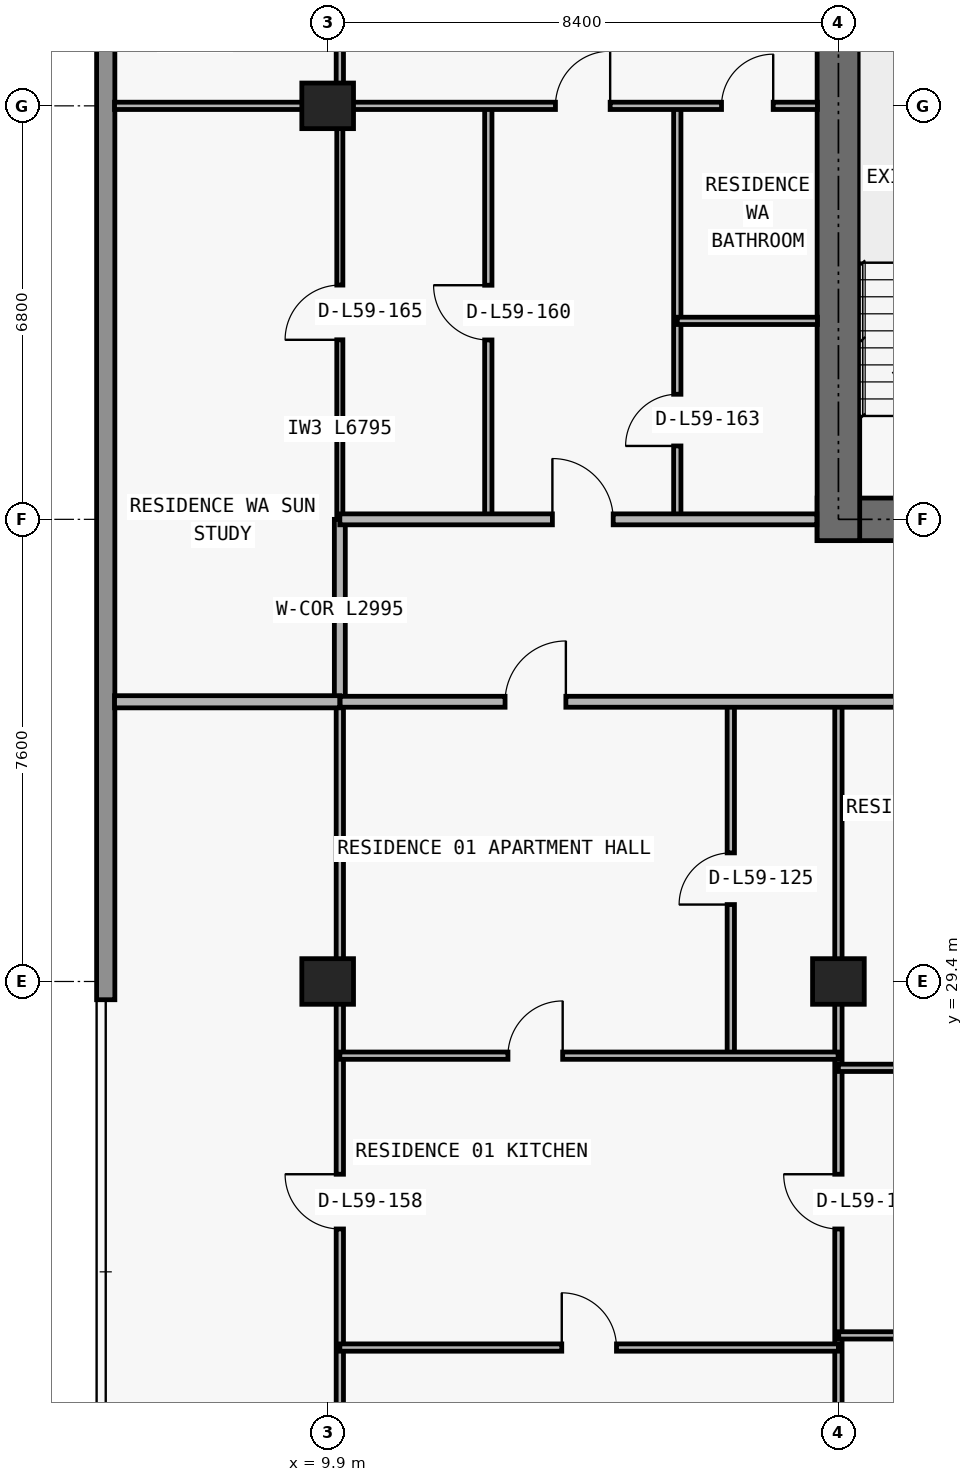
"""IFC4 building model, lengths in metres.
Left out: names, types, materials, properties, quantities, classifications, styles, units other than length and angle.
Written with IfcOpenShell. Run it as: python <this file> out.ifc"""

import sys

from ifc_helpers import new_model, si_unit, direction, frame, frame_2d, origin, origin_2d, place, context, subcontext, project, spatial, rectangle, extrude, element, fill, save


model = new_model("IFC4")
c1 = context("Model", 3, precision=1e-05, world=origin(), true_north=direction((0.0, 1.0)))
c2 = subcontext(c1, "Body", "Model", "MODEL_VIEW")
j1 = project(units=[si_unit("LENGTHUNIT", "METRE"), si_unit("PLANEANGLEUNIT", "RADIAN")], contexts=[c1])
p1 = place(None, origin())
s1 = spatial("IfcSite", under=j1, at=p1, CompositionType="ELEMENT")
p2 = place(p1, origin())
s2 = spatial("IfcBuilding", under=s1, at=p2, CompositionType="ELEMENT")
p3 = place(p2, frame((0.0, 0.0, 211.5)))
s3 = spatial("IfcBuildingStorey", under=s2, at=p3, CompositionType="ELEMENT", Elevation=211.5)
for number, where, z_axis, x_axis in (
    (1, (9.9, 29.4, 0.0), (0.0, 0.0, 1.0), (1.0, 0.0, 0.0)),
    (2, (18.3, 29.4, 0.0), (0.0, 0.0, 1.0), (1.0, 0.0, 0.0)),
    (3, (9.9, 43.8, 0.0), (0.0, 0.0, 1.0), (1.0, 0.0, 0.0)),
):
    element("IfcColumn", number, at=place(p3, frame(where, z_axis=z_axis, x_axis=x_axis)), inside=s3, PredefinedType="COLUMN", context=c2, shape_type="SweptSolid", body=[
        extrude(rectangle(XDim=0.85, YDim=0.75, at=origin_2d()), origin(), (0.0, 0.0, 1.0), 3.05),
    ])
p4 = place(p3, frame((17.95, 37.0, 0.0), z_axis=(0.0, 0.0, 1.0), x_axis=(1.0, 0.0, 0.0)))
e4 = element("IfcWall", 4, at=p4, inside=s3, PredefinedType="SHEAR", context=c2, shape_type="SweptSolid", body=[
    extrude(rectangle(XDim=41.9, YDim=0.7, at=frame_2d((20.95, 0.0))), origin(), (0.0, 0.0, 1.0), 3.05),
])
p5 = place(p4, frame((14.35, 0.0, 0.0)))
e5 = element("IfcOpeningElement", 5, at=p5, cuts=e4, PredefinedType="OPENING", context=c2, shape_type="SweptSolid", body=[
    extrude(rectangle(XDim=1.1, YDim=2.15, at=frame_2d((0.55, 1.075))), frame((0.0, 0.36, 0.0), z_axis=(0.0, -1.0, 0.0), x_axis=(1.0, 0.0, 0.0)), (0.0, 0.0, 1.0), 0.72),
])
p6 = place(p4, frame((6.2, 0.0, 0.0)))
e6 = element("IfcOpeningElement", 6, at=p6, cuts=e4, PredefinedType="OPENING", context=c2, shape_type="SweptSolid", body=[
    extrude(rectangle(XDim=1.05, YDim=2.15, at=frame_2d((0.525, 1.075))), frame((0.0, 0.36, 0.0), z_axis=(0.0, -1.0, 0.0), x_axis=(1.0, 0.0, 0.0)), (0.0, 0.0, 1.0), 0.72),
])
p7 = place(p4, frame((34.7, 0.0, 0.0)))
e7 = element("IfcOpeningElement", 7, at=p7, cuts=e4, PredefinedType="OPENING", context=c2, shape_type="SweptSolid", body=[
    extrude(rectangle(XDim=1.05, YDim=2.15, at=frame_2d((0.525, 1.075))), frame((0.0, 0.36, 0.0), z_axis=(0.0, -1.0, 0.0), x_axis=(1.0, 0.0, 0.0)), (0.0, 0.0, 1.0), 0.72),
])
p8 = place(p4, frame((10.812, 0.0, 0.0)))
e8 = element("IfcOpeningElement", 8, at=p8, cuts=e4, PredefinedType="OPENING", context=c2, shape_type="SweptSolid", body=[
    extrude(rectangle(XDim=1.05, YDim=2.15, at=frame_2d((0.525, 1.075))), frame((0.0, 0.36, 0.0), z_axis=(0.0, -1.0, 0.0), x_axis=(1.0, 0.0, 0.0)), (0.0, 0.0, 1.0), 0.72),
])
p9 = place(p4, frame((24.05, 0.0, 0.0)))
e9 = element("IfcOpeningElement", 9, at=p9, cuts=e4, PredefinedType="OPENING", context=c2, shape_type="SweptSolid", body=[
    extrude(rectangle(XDim=1.05, YDim=2.15, at=frame_2d((0.525, 1.075))), frame((0.0, 0.36, 0.0), z_axis=(0.0, -1.0, 0.0), x_axis=(1.0, 0.0, 0.0)), (0.0, 0.0, 1.0), 0.72),
])
p10 = place(p3, frame((18.3, 36.65, 0.0), z_axis=(0.0, 0.0, 1.0), x_axis=(0.0, 1.0, 0.0)))
e10 = element("IfcWall", 10, at=p10, inside=s3, PredefinedType="SHEAR", context=c2, shape_type="SweptSolid", body=[
    extrude(rectangle(XDim=13.95, YDim=0.7, at=frame_2d((6.975, 0.0))), origin(), (0.0, 0.0, 1.0), 3.05),
])
p11 = place(p3, frame((6.25, 29.1, 0.0), z_axis=(0.0, 0.0, 1.0), x_axis=(0.0, 1.0, 0.0)))
e11 = element("IfcWall", 11, at=p11, inside=s3, PredefinedType="STANDARD", context=c2, shape_type="SweptSolid", body=[
    extrude(rectangle(XDim=17.9, YDim=0.3, at=frame_2d((8.95, 0.0))), origin(), (0.0, 0.0, 1.0), 3.05),
])
p12 = place(p3, frame((10.1, 11.285, 0.0), z_axis=(0.0, 0.0, 1.0), x_axis=(0.0, 1.0, 0.0)))
e12 = element("IfcWall", 12, at=p12, inside=s3, PredefinedType="PARTITIONING", context=c2, shape_type="SweptSolid", body=[
    extrude(rectangle(XDim=22.715, YDim=0.12, at=frame_2d((11.357, 0.0))), origin(), (0.0, 0.0, 1.0), 2.263),
])
p13 = place(p12, frame((14.045, 0.0, 0.0)))
e13 = element("IfcOpeningElement", 13, at=p13, cuts=e12, PredefinedType="OPENING", context=c2, shape_type="SweptSolid", body=[
    extrude(rectangle(XDim=0.9, YDim=2.15, at=frame_2d((0.45, 1.075))), frame((0.0, 0.07, 0.0), z_axis=(0.0, -1.0, 0.0), x_axis=(1.0, 0.0, 0.0)), (0.0, 0.0, 1.0), 0.14),
])
p14 = place(p3, frame((10.1, 34.005, 0.0), z_axis=(0.0, 0.0, 1.0), x_axis=(0.0, 1.0, 0.0)))
e14 = element("IfcWall", 14, at=p14, inside=s3, PredefinedType="PARTITIONING", context=c2, shape_type="SweptSolid", body=[
    extrude(rectangle(XDim=2.995, YDim=0.18, at=frame_2d((1.498, 0.0))), origin(), (0.0, 0.0, 1.0), 2.263),
])
p15 = place(p3, frame((10.1, 37.005, 0.0), z_axis=(0.0, 0.0, 1.0), x_axis=(0.0, 1.0, 0.0)))
e15 = element("IfcWall", 15, at=p15, inside=s3, PredefinedType="MOVABLE", context=c2, shape_type="SweptSolid", body=[
    extrude(rectangle(XDim=6.795, YDim=0.1, at=frame_2d((3.397, 0.0))), origin(), (0.0, 0.0, 1.0), 2.263),
])
p16 = place(p15, frame((2.948, 0.0, 0.0)))
e16 = element("IfcOpeningElement", 16, at=p16, cuts=e15, PredefinedType="OPENING", context=c2, shape_type="SweptSolid", body=[
    extrude(rectangle(XDim=0.9, YDim=2.15, at=frame_2d((0.45, 1.075))), frame((0.0, 0.06, 0.0), z_axis=(0.0, -1.0, 0.0), x_axis=(1.0, 0.0, 0.0)), (0.0, 0.0, 1.0), 0.12),
])
p17 = place(p3, frame((10.1, 43.805, 0.0), z_axis=(0.0, 0.0, 1.0), x_axis=(0.0, 1.0, 0.0)))
e17 = element("IfcWall", 17, at=p17, inside=s3, PredefinedType="PARTITIONING", context=c2, shape_type="SweptSolid", body=[
    extrude(rectangle(XDim=3.075, YDim=0.12, at=frame_2d((1.538, 0.0))), origin(), (0.0, 0.0, 1.0), 3.05),
])
p18 = place(p17, frame((1.087, 0.0, 0.0)))
e18 = element("IfcOpeningElement", 18, at=p18, cuts=e17, PredefinedType="OPENING", context=c2, shape_type="SweptSolid", body=[
    extrude(rectangle(XDim=0.9, YDim=2.15, at=frame_2d((0.45, 1.075))), frame((0.0, 0.07, 0.0), z_axis=(0.0, -1.0, 0.0), x_axis=(1.0, 0.0, 0.0)), (0.0, 0.0, 1.0), 0.14),
])
p19 = place(p3, frame((12.542, 37.0, 0.0), z_axis=(0.0, 0.0, 1.0), x_axis=(0.0, 1.0, 0.0)))
e19 = element("IfcWall", 19, at=p19, inside=s3, PredefinedType="PARTITIONING", context=c2, shape_type="SweptSolid", body=[
    extrude(rectangle(XDim=6.8, YDim=0.12, at=frame_2d((3.4, 0.0))), origin(), (0.0, 0.0, 1.0), 3.05),
])
p20 = place(p19, frame((2.95, 0.0, 0.0)))
e20 = element("IfcOpeningElement", 20, at=p20, cuts=e19, PredefinedType="OPENING", context=c2, shape_type="SweptSolid", body=[
    extrude(rectangle(XDim=0.9, YDim=2.15, at=frame_2d((0.45, 1.075))), frame((0.0, 0.07, 0.0), z_axis=(0.0, -1.0, 0.0), x_axis=(1.0, 0.0, 0.0)), (0.0, 0.0, 1.0), 0.14),
])
p21 = place(p3, frame((15.65, 37.0, 0.0), z_axis=(0.0, 0.0, 1.0), x_axis=(0.0, 1.0, 0.0)))
e21 = element("IfcWall", 21, at=p21, inside=s3, PredefinedType="PARTITIONING", context=c2, shape_type="SweptSolid", body=[
    extrude(rectangle(XDim=6.8, YDim=0.12, at=frame_2d((3.4, 0.0))), origin(), (0.0, 0.0, 1.0), 3.05),
])
p22 = place(p21, frame((1.207, 0.0, 0.0)))
e22 = element("IfcOpeningElement", 22, at=p22, cuts=e21, PredefinedType="OPENING", context=c2, shape_type="SweptSolid", body=[
    extrude(rectangle(XDim=0.85, YDim=2.1, at=frame_2d((0.425, 1.05))), frame((0.0, 0.07, 0.0), z_axis=(0.0, -1.0, 0.0), x_axis=(1.0, 0.0, 0.0)), (0.0, 0.0, 1.0), 0.14),
])
p23 = place(p3, frame((16.53, 28.18, 0.0), z_axis=(0.0, 0.0, 1.0), x_axis=(0.0, 1.0, 0.0)))
e23 = element("IfcWall", 23, at=p23, inside=s3, PredefinedType="PARTITIONING", context=c2, shape_type="SweptSolid", body=[
    extrude(rectangle(XDim=5.82, YDim=0.12, at=frame_2d((2.91, 0.0))), origin(), (0.0, 0.0, 1.0), 3.05),
])
p24 = place(p23, frame((2.485, 0.0, 0.0)))
e24 = element("IfcOpeningElement", 24, at=p24, cuts=e23, PredefinedType="OPENING", context=c2, shape_type="SweptSolid", body=[
    extrude(rectangle(XDim=0.85, YDim=2.1, at=frame_2d((0.425, 1.05))), frame((0.0, 0.07, 0.0), z_axis=(0.0, -1.0, 0.0), x_axis=(1.0, 0.0, 0.0)), (0.0, 0.0, 1.0), 0.14),
])
p25 = place(p3, frame((18.3, 11.24, 0.0), z_axis=(0.0, 0.0, 1.0), x_axis=(0.0, 1.0, 0.0)))
e25 = element("IfcWall", 25, at=p25, inside=s3, PredefinedType="PARTITIONING", context=c2, shape_type="SweptSolid", body=[
    extrude(rectangle(XDim=22.76, YDim=0.12, at=frame_2d((11.38, 0.0))), origin(), (0.0, 0.0, 1.0), 2.263),
])
p26 = place(p25, frame((14.09, 0.0, 0.0)))
e26 = element("IfcOpeningElement", 26, at=p26, cuts=e25, PredefinedType="OPENING", context=c2, shape_type="SweptSolid", body=[
    extrude(rectangle(XDim=0.9, YDim=2.15, at=frame_2d((0.45, 1.075))), frame((0.0, 0.07, 0.0), z_axis=(0.0, -1.0, 0.0), x_axis=(1.0, 0.0, 0.0)), (0.0, 0.0, 1.0), 0.14),
])
p27 = place(p3, frame((10.1, 23.38, 0.0), z_axis=(0.0, 0.0, 1.0), x_axis=(1.0, 0.0, 0.0)))
e27 = element("IfcWall", 27, at=p27, inside=s3, PredefinedType="PARTITIONING", context=c2, shape_type="SweptSolid", body=[
    extrude(rectangle(XDim=8.2, YDim=0.12, at=frame_2d((4.1, 0.0))), origin(), (0.0, 0.0, 1.0), 3.05),
])
p28 = place(p27, frame((3.65, 0.0, 0.0)))
e28 = element("IfcOpeningElement", 28, at=p28, cuts=e27, PredefinedType="OPENING", context=c2, shape_type="SweptSolid", body=[
    extrude(rectangle(XDim=0.9, YDim=2.15, at=frame_2d((0.45, 1.075))), frame((0.0, 0.07, 0.0), z_axis=(0.0, -1.0, 0.0), x_axis=(1.0, 0.0, 0.0)), (0.0, 0.0, 1.0), 0.14),
])
p29 = place(p3, frame((18.305, 23.58, 0.0), z_axis=(0.0, 0.0, 1.0), x_axis=(1.0, 0.0, 0.0)))
e29 = element("IfcWall", 29, at=p29, inside=s3, PredefinedType="PARTITIONING", context=c2, shape_type="SweptSolid", body=[
    extrude(rectangle(XDim=8.175, YDim=0.12, at=frame_2d((4.087, 0.0))), origin(), (0.0, 0.0, 1.0), 3.05),
])
p30 = place(p29, frame((3.637, 0.0, 0.0)))
e30 = element("IfcOpeningElement", 30, at=p30, cuts=e29, PredefinedType="OPENING", context=c2, shape_type="SweptSolid", body=[
    extrude(rectangle(XDim=0.9, YDim=2.15, at=frame_2d((0.45, 1.075))), frame((0.0, 0.07, 0.0), z_axis=(0.0, -1.0, 0.0), x_axis=(1.0, 0.0, 0.0)), (0.0, 0.0, 1.0), 0.14),
])
p31 = place(p3, frame((18.3, 27.98, 0.0), z_axis=(0.0, 0.0, 1.0), x_axis=(1.0, 0.0, 0.0)))
e31 = element("IfcWall", 31, at=p31, inside=s3, PredefinedType="PARTITIONING", context=c2, shape_type="SweptSolid", body=[
    extrude(rectangle(XDim=8.18, YDim=0.12, at=frame_2d((4.09, 0.0))), origin(), (0.0, 0.0, 1.0), 3.05),
])
p32 = place(p31, frame((2.952, 0.0, 0.0)))
e32 = element("IfcOpeningElement", 32, at=p32, cuts=e31, PredefinedType="OPENING", context=c2, shape_type="SweptSolid", body=[
    extrude(rectangle(XDim=0.9, YDim=2.15, at=frame_2d((0.45, 1.075))), frame((0.0, 0.07, 0.0), z_axis=(0.0, -1.0, 0.0), x_axis=(1.0, 0.0, 0.0)), (0.0, 0.0, 1.0), 0.14),
])
p33 = place(p3, frame((10.1, 28.18, 0.0), z_axis=(0.0, 0.0, 1.0), x_axis=(1.0, 0.0, 0.0)))
e33 = element("IfcWall", 33, at=p33, inside=s3, PredefinedType="PARTITIONING", context=c2, shape_type="SweptSolid", body=[
    extrude(rectangle(XDim=8.195, YDim=0.12, at=frame_2d((4.097, 0.0))), origin(), (0.0, 0.0, 1.0), 3.05),
])
p34 = place(p33, frame((2.765, 0.0, 0.0)))
e34 = element("IfcOpeningElement", 34, at=p34, cuts=e33, PredefinedType="OPENING", context=c2, shape_type="SweptSolid", body=[
    extrude(rectangle(XDim=0.9, YDim=2.15, at=frame_2d((0.45, 1.075))), frame((0.0, 0.07, 0.0), z_axis=(0.0, -1.0, 0.0), x_axis=(1.0, 0.0, 0.0)), (0.0, 0.0, 1.0), 0.14),
])
p35 = place(p3, frame((6.395, 34.0, 0.0), z_axis=(0.0, 0.0, 1.0), x_axis=(1.0, 0.0, 0.0)))
e35 = element("IfcWall", 35, at=p35, inside=s3, PredefinedType="PARTITIONING", context=c2, shape_type="SweptSolid", body=[
    extrude(rectangle(XDim=3.705, YDim=0.2, at=frame_2d((1.853, 0.0))), origin(), (0.0, 0.0, 1.0), 3.05),
])
p36 = place(p3, frame((10.105, 34.0, 0.0), z_axis=(0.0, 0.0, 1.0), x_axis=(1.0, 0.0, 0.0)))
e36 = element("IfcWall", 36, at=p36, inside=s3, PredefinedType="PARTITIONING", context=c2, shape_type="SweptSolid", body=[
    extrude(rectangle(XDim=16.545, YDim=0.18, at=frame_2d((8.272, 0.0))), origin(), (0.0, 0.0, 1.0), 3.05),
])
p37 = place(p36, frame((2.712, 0.0, 0.0)))
e37 = element("IfcOpeningElement", 37, at=p37, cuts=e36, PredefinedType="OPENING", context=c2, shape_type="SweptSolid", body=[
    extrude(rectangle(XDim=1.0, YDim=2.2, at=frame_2d((0.5, 1.1))), frame((0.0, 0.1, 0.0), z_axis=(0.0, -1.0, 0.0), x_axis=(1.0, 0.0, 0.0)), (0.0, 0.0, 1.0), 0.2),
])
p38 = place(p3, frame((10.1, 37.0, 0.0), z_axis=(0.0, 0.0, 1.0), x_axis=(1.0, 0.0, 0.0)))
e38 = element("IfcWall", 38, at=p38, inside=s3, PredefinedType="PARTITIONING", context=c2, shape_type="SweptSolid", body=[
    extrude(rectangle(XDim=7.845, YDim=0.18, at=frame_2d((3.922, 0.0))), origin(), (0.0, 0.0, 1.0), 3.05),
])
p39 = place(p38, frame((3.496, 0.0, 0.0)))
e39 = element("IfcOpeningElement", 39, at=p39, cuts=e38, PredefinedType="OPENING", context=c2, shape_type="SweptSolid", body=[
    extrude(rectangle(XDim=1.0, YDim=2.2, at=frame_2d((0.5, 1.1))), frame((0.0, 0.1, 0.0), z_axis=(0.0, -1.0, 0.0), x_axis=(1.0, 0.0, 0.0)), (0.0, 0.0, 1.0), 0.2),
])
p40 = place(p3, frame((15.65, 40.264, 0.0), z_axis=(0.0, 0.0, 1.0), x_axis=(1.0, 0.0, 0.0)))
e40 = element("IfcWall", 40, at=p40, inside=s3, PredefinedType="PARTITIONING", context=c2, shape_type="SweptSolid", body=[
    extrude(rectangle(XDim=2.305, YDim=0.12, at=frame_2d((1.153, 0.0))), origin(), (0.0, 0.0, 1.0), 3.05),
])
p41 = place(p3, frame((6.395, 43.8, 0.0), z_axis=(0.0, 0.0, 1.0), x_axis=(1.0, 0.0, 0.0)))
e41 = element("IfcWall", 41, at=p41, inside=s3, PredefinedType="PARTITIONING", context=c2, shape_type="SweptSolid", body=[
    extrude(rectangle(XDim=11.56, YDim=0.12, at=frame_2d((5.78, 0.0))), origin(), (0.0, 0.0, 1.0), 2.418),
])
p42 = place(p41, frame((7.251, 0.0, 0.0)))
e42 = element("IfcOpeningElement", 42, at=p42, cuts=e41, PredefinedType="OPENING", context=c2, shape_type="SweptSolid", body=[
    extrude(rectangle(XDim=0.9, YDim=2.15, at=frame_2d((0.45, 1.075))), frame((0.0, 0.07, 0.0), z_axis=(0.0, -1.0, 0.0), x_axis=(1.0, 0.0, 0.0)), (0.0, 0.0, 1.0), 0.14),
])
p43 = place(p41, frame((9.982, 0.0, 0.0)))
e43 = element("IfcOpeningElement", 43, at=p43, cuts=e41, PredefinedType="OPENING", context=c2, shape_type="SweptSolid", body=[
    extrude(rectangle(XDim=0.85, YDim=2.1, at=frame_2d((0.425, 1.05))), frame((0.0, 0.07, 0.0), z_axis=(0.0, -1.0, 0.0), x_axis=(1.0, 0.0, 0.0)), (0.0, 0.0, 1.0), 0.14),
])
p44 = place(p37, origin())
e44 = element("IfcDoor", 44, at=p44, inside=s3, OperationType="SINGLE_SWING_RIGHT", PredefinedType="DOOR", context=c2, shape_type="SweptSolid", body=[
    extrude(rectangle(XDim=1.0, YDim=2.2, at=frame_2d((0.5, 1.1))), frame((0.0, 0.025, 0.0), z_axis=(0.0, -1.0, 0.0), x_axis=(1.0, 0.0, 0.0)), (0.0, 0.0, 1.0), 0.05),
])
fill(e37, e44)
p45 = place(p24, origin())
e45 = element("IfcDoor", 45, at=p45, inside=s3, OperationType="SINGLE_SWING_LEFT", PredefinedType="DOOR", context=c2, shape_type="SweptSolid", body=[
    extrude(rectangle(XDim=0.85, YDim=2.1, at=frame_2d((0.425, 1.05))), frame((0.0, 0.025, 0.0), z_axis=(0.0, -1.0, 0.0), x_axis=(1.0, 0.0, 0.0)), (0.0, 0.0, 1.0), 0.05),
])
fill(e24, e45)
p46 = place(p34, origin())
e46 = element("IfcDoor", 46, at=p46, inside=s3, OperationType="SINGLE_SWING_RIGHT", PredefinedType="DOOR", context=c2, shape_type="SweptSolid", body=[
    extrude(rectangle(XDim=0.9, YDim=2.15, at=frame_2d((0.45, 1.075))), frame((0.0, 0.025, 0.0), z_axis=(0.0, -1.0, 0.0), x_axis=(1.0, 0.0, 0.0)), (0.0, 0.0, 1.0), 0.05),
])
fill(e34, e46)
p47 = place(p28, origin())
e47 = element("IfcDoor", 47, at=p47, inside=s3, OperationType="SINGLE_SWING_LEFT", PredefinedType="DOOR", context=c2, shape_type="SweptSolid", body=[
    extrude(rectangle(XDim=0.9, YDim=2.15, at=frame_2d((0.45, 1.075))), frame((0.0, 0.025, 0.0), z_axis=(0.0, -1.0, 0.0), x_axis=(1.0, 0.0, 0.0)), (0.0, 0.0, 1.0), 0.05),
])
fill(e28, e47)
p48 = place(p26, origin())
e48 = element("IfcDoor", 48, at=p48, inside=s3, OperationType="SINGLE_SWING_RIGHT", PredefinedType="DOOR", context=c2, shape_type="SweptSolid", body=[
    extrude(rectangle(XDim=0.9, YDim=2.15, at=frame_2d((0.45, 1.075))), frame((0.0, 0.025, 0.0), z_axis=(0.0, -1.0, 0.0), x_axis=(1.0, 0.0, 0.0)), (0.0, 0.0, 1.0), 0.05),
])
fill(e26, e48)
p49 = place(p13, origin())
e49 = element("IfcDoor", 49, at=p49, inside=s3, OperationType="SINGLE_SWING_RIGHT", PredefinedType="DOOR", context=c2, shape_type="SweptSolid", body=[
    extrude(rectangle(XDim=0.9, YDim=2.15, at=frame_2d((0.45, 1.075))), frame((0.0, 0.025, 0.0), z_axis=(0.0, -1.0, 0.0), x_axis=(1.0, 0.0, 0.0)), (0.0, 0.0, 1.0), 0.05),
])
fill(e13, e49)
p50 = place(p20, origin())
e50 = element("IfcDoor", 50, at=p50, inside=s3, OperationType="SINGLE_SWING_RIGHT", PredefinedType="DOOR", context=c2, shape_type="SweptSolid", body=[
    extrude(rectangle(XDim=0.9, YDim=2.15, at=frame_2d((0.45, 1.075))), frame((0.0, 0.025, 0.0), z_axis=(0.0, -1.0, 0.0), x_axis=(1.0, 0.0, 0.0)), (0.0, 0.0, 1.0), 0.05),
])
fill(e20, e50)
p51 = place(p39, origin())
e51 = element("IfcDoor", 51, at=p51, inside=s3, OperationType="SINGLE_SWING_LEFT", PredefinedType="DOOR", context=c2, shape_type="SweptSolid", body=[
    extrude(rectangle(XDim=1.0, YDim=2.2, at=frame_2d((0.5, 1.1))), frame((0.0, 0.025, 0.0), z_axis=(0.0, -1.0, 0.0), x_axis=(1.0, 0.0, 0.0)), (0.0, 0.0, 1.0), 0.05),
])
fill(e39, e51)
p52 = place(p42, origin())
e52 = element("IfcDoor", 52, at=p52, inside=s3, OperationType="SINGLE_SWING_RIGHT", PredefinedType="DOOR", context=c2, shape_type="SweptSolid", body=[
    extrude(rectangle(XDim=0.9, YDim=2.15, at=frame_2d((0.45, 1.075))), frame((0.0, 0.025, 0.0), z_axis=(0.0, -1.0, 0.0), x_axis=(1.0, 0.0, 0.0)), (0.0, 0.0, 1.0), 0.05),
])
fill(e42, e52)
p53 = place(p22, origin())
e53 = element("IfcDoor", 53, at=p53, inside=s3, OperationType="SINGLE_SWING_LEFT", PredefinedType="DOOR", context=c2, shape_type="SweptSolid", body=[
    extrude(rectangle(XDim=0.85, YDim=2.1, at=frame_2d((0.425, 1.05))), frame((0.0, 0.025, 0.0), z_axis=(0.0, -1.0, 0.0), x_axis=(1.0, 0.0, 0.0)), (0.0, 0.0, 1.0), 0.05),
])
fill(e22, e53)
p54 = place(p43, origin())
e54 = element("IfcDoor", 54, at=p54, inside=s3, OperationType="SINGLE_SWING_RIGHT", PredefinedType="DOOR", context=c2, shape_type="SweptSolid", body=[
    extrude(rectangle(XDim=0.85, YDim=2.1, at=frame_2d((0.425, 1.05))), frame((0.0, 0.025, 0.0), z_axis=(0.0, -1.0, 0.0), x_axis=(1.0, 0.0, 0.0)), (0.0, 0.0, 1.0), 0.05),
])
fill(e43, e54)
p55 = place(p16, origin())
e55 = element("IfcDoor", 55, at=p55, inside=s3, OperationType="SINGLE_SWING_LEFT", PredefinedType="DOOR", context=c2, shape_type="SweptSolid", body=[
    extrude(rectangle(XDim=0.9, YDim=2.15, at=frame_2d((0.45, 1.075))), frame((0.0, 0.025, 0.0), z_axis=(0.0, -1.0, 0.0), x_axis=(1.0, 0.0, 0.0)), (0.0, 0.0, 1.0), 0.05),
])
fill(e16, e55)
save(model, sys.argv[1])
